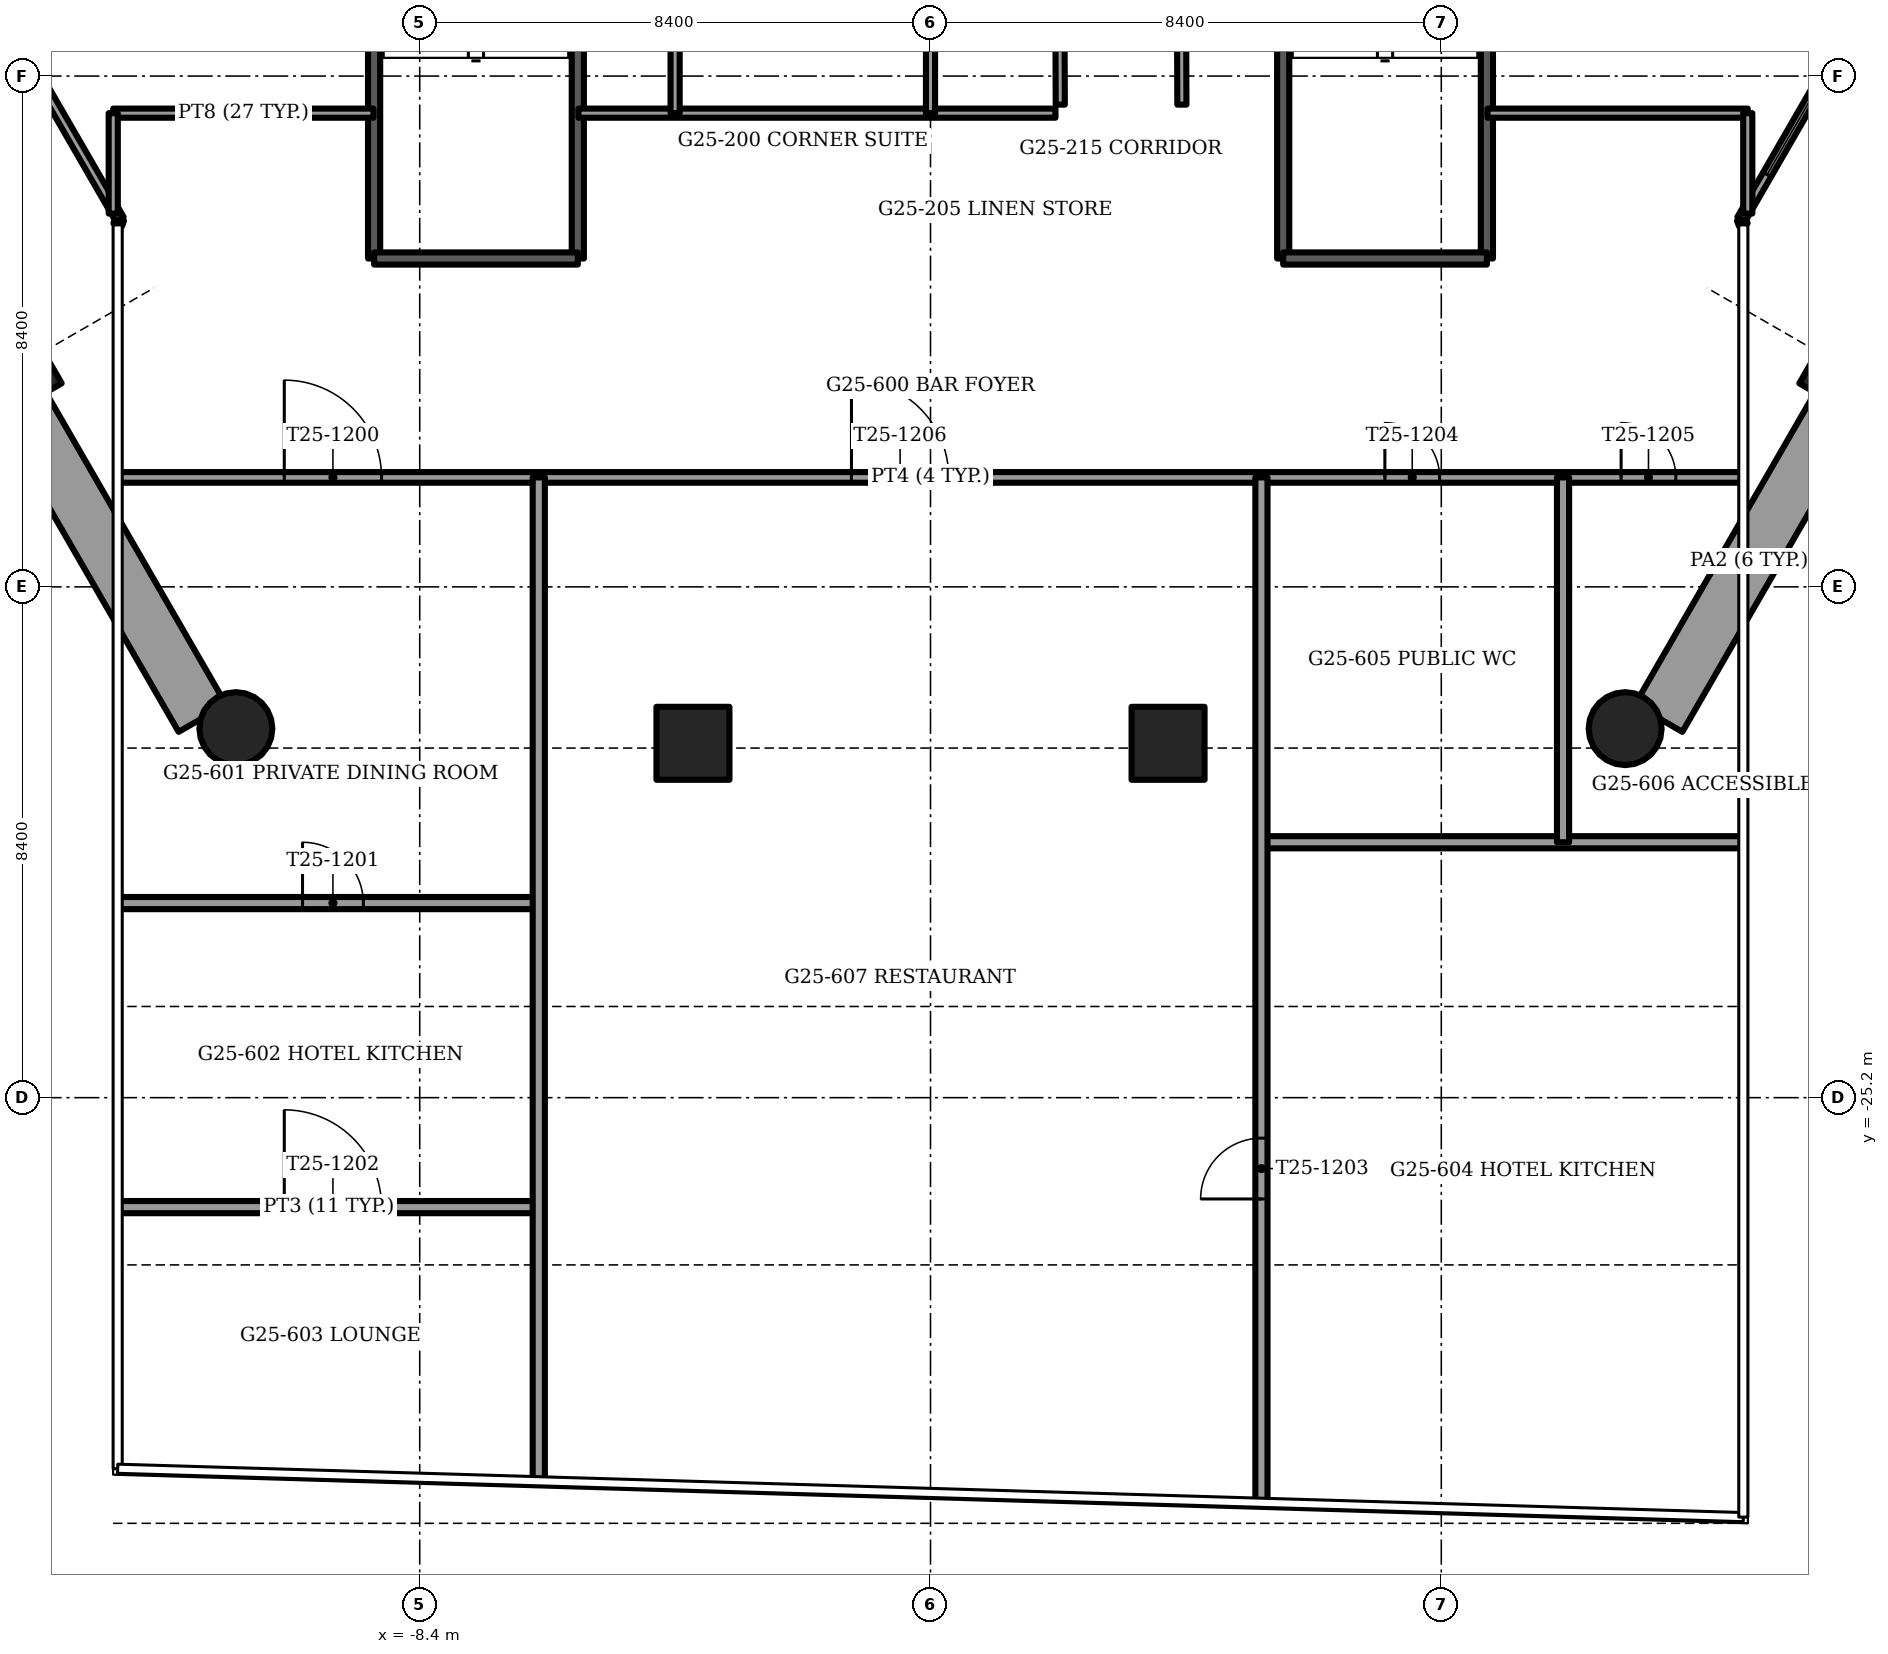
"""IFC4 building model, lengths in metres.
Left out: names, types, materials, properties, quantities, classifications, styles, units other than length and angle.
Written with IfcOpenShell. Run it as: python <this file> out.ifc"""

import sys

from ifc_helpers import new_model, si_unit, direction, frame, frame_2d, origin, origin_2d, place, context, subcontext, project, spatial, rectangle, circle, extrude, element, fill, save


model = new_model("IFC4")
c1 = context("Model", 3, precision=1e-05, world=origin(), true_north=direction((0.0, 1.0)))
c2 = subcontext(c1, "Body", "Model", "MODEL_VIEW")
j1 = project(units=[si_unit("LENGTHUNIT", "METRE"), si_unit("PLANEANGLEUNIT", "RADIAN")], contexts=[c1])
p1 = place(None, origin())
s1 = spatial("IfcSite", under=j1, at=p1, CompositionType="ELEMENT")
p2 = place(p1, origin())
s2 = spatial("IfcBuilding", under=s1, at=p2, CompositionType="ELEMENT")
p3 = place(p2, frame((0.0, 0.0, 100.5)))
s3 = spatial("IfcBuildingStorey", under=s2, at=p3, CompositionType="ELEMENT", Elevation=100.5)
for number, where, z_axis, x_axis in (
    (1, (-11.424, -19.132, -1.2), (0.0, 0.0, 1.0), (1.0, 0.0, 0.0)),
    (2, (11.424, -19.132, -1.2), (0.0, 0.0, 1.0), (1.0, 0.0, 0.0)),
):
    element("IfcColumn", number, at=place(p3, frame(where, z_axis=z_axis, x_axis=x_axis)), inside=s3, PredefinedType="COLUMN", context=c2, shape_type="SweptSolid", body=[
        extrude(circle(Radius=0.6, at=origin_2d()), origin(), (0.0, 0.0, 1.0), 3.75),
    ])
for number, where, z_axis, x_axis in (
    (3, (-15.107, -13.233, -1.2), (0.0, 0.0, 1.0), (-0.5, 0.866, 0.0)),
    (4, (-3.907, -19.373, -1.2), (0.0, 0.0, 1.0), (-1.0, 0.0, 0.0)),
    (5, (3.907, -19.373, -1.2), (0.0, 0.0, 1.0), (-1.0, 0.0, 0.0)),
    (6, (15.107, -13.233, -1.2), (0.0, 0.0, 1.0), (-0.5, -0.866, 0.0)),
):
    element("IfcColumn", number, at=place(p3, frame(where, z_axis=z_axis, x_axis=x_axis)), inside=s3, PredefinedType="COLUMN", context=c2, shape_type="SweptSolid", body=[
        extrude(rectangle(XDim=1.2, YDim=1.2, at=origin_2d()), origin(), (0.0, 0.0, 1.0), 3.75),
    ])
for number, where, z_axis, x_axis in (
    (7, (-14.952, -13.802, 0.0), (0.0, 0.0, 1.0), (0.5, -0.866, 0.0)),
    (8, (11.975, -18.959, 0.0), (0.0, 0.0, 1.0), (0.5, 0.866, 0.0)),
):
    element("IfcWall", number, at=place(p3, frame(where, z_axis=z_axis, x_axis=x_axis)), inside=s3, PredefinedType="PARAPET", context=c2, shape_type="SweptSolid", body=[
        extrude(rectangle(XDim=5.955, YDim=0.9, at=frame_2d((2.978, 0.0))), origin(), (0.0, 0.0, 1.0), 1.1),
    ])
p4 = place(p3, frame((-19.047, -0.86, 0.0), z_axis=(0.0, 0.0, 1.0), x_axis=(0.499999897272, -0.866025463095, 0.0)))
e9 = element("IfcWall", 9, at=p4, inside=s3, PredefinedType="SOLIDWALL", context=c2, shape_type="SweptSolid", body=[
    extrude(rectangle(XDim=11.426, YDim=0.15, at=frame_2d((5.713, 0.0))), origin(), (0.0, 0.0, 1.0), 3.45),
])
p5 = place(p4, frame((4.406, 0.0, 0.15)))
e10 = element("IfcOpeningElement", 10, at=p5, cuts=e9, PredefinedType="OPENING", context=c2, shape_type="SweptSolid", body=[
    extrude(rectangle(XDim=1.5, YDim=2.2, at=frame_2d((0.75, 1.1))), frame((0.0, 0.075, 0.0), z_axis=(0.0, -1.0, 0.0), x_axis=(1.0, 0.0, 0.0)), (0.0, 0.0, 1.0), 0.15),
])
p6 = place(p4, frame((6.979, 0.0, 0.15)))
e11 = element("IfcOpeningElement", 11, at=p6, cuts=e9, PredefinedType="OPENING", context=c2, shape_type="SweptSolid", body=[
    extrude(rectangle(XDim=1.7, YDim=2.2, at=frame_2d((0.85, 1.1))), frame((0.0, 0.075, 0.0), z_axis=(0.0, -1.0, 0.0), x_axis=(1.0, 0.0, 0.0)), (0.0, 0.0, 1.0), 0.15),
])
p7 = place(p3, frame((13.334, -10.755, 0.0), z_axis=(0.0, 0.0, 1.0), x_axis=(0.499999897272, 0.866025463095, 0.0)))
e12 = element("IfcWall", 12, at=p7, inside=s3, PredefinedType="SOLIDWALL", context=c2, shape_type="SweptSolid", body=[
    extrude(rectangle(XDim=11.426, YDim=0.15, at=frame_2d((5.713, 0.0))), origin(), (0.0, 0.0, 1.0), 3.45),
])
p8 = place(p7, frame((0.847, 0.0, 0.15)))
e13 = element("IfcOpeningElement", 13, at=p8, cuts=e12, PredefinedType="OPENING", context=c2, shape_type="SweptSolid", body=[
    extrude(rectangle(XDim=1.7, YDim=2.2, at=frame_2d((0.85, 1.1))), frame((0.0, 0.075, 0.0), z_axis=(0.0, -1.0, 0.0), x_axis=(1.0, 0.0, 0.0)), (0.0, 0.0, 1.0), 0.15),
])
p9 = place(p7, frame((6.322, 0.0, 0.15)))
e14 = element("IfcOpeningElement", 14, at=p9, cuts=e12, PredefinedType="OPENING", context=c2, shape_type="SweptSolid", body=[
    extrude(rectangle(XDim=1.5, YDim=2.2, at=frame_2d((0.75, 1.1))), frame((0.0, 0.075, 0.0), z_axis=(0.0, -1.0, 0.0), x_axis=(1.0, 0.0, 0.0)), (0.0, 0.0, 1.0), 0.15),
])
for number, where, z_axis, x_axis in (
    (15, (-13.334, -10.755, 0.0), (0.0, 0.0, 1.0), (-0.338, -0.941, 0.0)),
    (16, (13.334, -10.755, 0.0), (0.0, 0.0, 1.0), (0.338, -0.941, 0.0)),
):
    element("IfcWall", number, at=place(p3, frame(where, z_axis=z_axis, x_axis=x_axis)), inside=s3, PredefinedType="SOLIDWALL", context=c2, shape_type="SweptSolid", body=[
        extrude(rectangle(XDim=0.098, YDim=0.15, at=frame_2d((0.049, 0.0))), origin(), (0.0, 0.0, 1.0), 3.45),
    ])
for number, where, z_axis, x_axis in (
    (17, (5.8, -3.7, -0.3), (0.0, 0.0, 1.0), (0.0, -1.0, 0.0)),
    (18, (9.15, -3.7, -0.3), (0.0, 0.0, 1.0), (0.0, -1.0, 0.0)),
):
    element("IfcWall", number, at=place(p3, frame(where, z_axis=z_axis, x_axis=x_axis)), inside=s3, PredefinedType="SOLIDWALL", context=c2, shape_type="SweptSolid", body=[
        extrude(rectangle(XDim=7.7, YDim=0.2, at=frame_2d((3.85, 0.0))), origin(), (0.0, 0.0, 1.0), 3.75),
    ])
p10 = place(p3, frame((5.8, -11.4, -0.3), z_axis=(0.0, 0.0, 1.0), x_axis=(1.0, 0.0, 0.0)))
e19 = element("IfcWall", 19, at=p10, inside=s3, PredefinedType="SOLIDWALL", context=c2, shape_type="SweptSolid", body=[
    extrude(rectangle(XDim=3.35, YDim=0.2, at=frame_2d((1.675, 0.0))), origin(), (0.0, 0.0, 1.0), 3.75),
])
for number, where, z_axis, x_axis in (
    (20, (-9.15, -3.7, -0.3), (0.0, 0.0, 1.0), (0.0, -1.0, 0.0)),
    (21, (-5.8, -3.7, -0.3), (0.0, 0.0, 1.0), (0.0, -1.0, 0.0)),
):
    element("IfcWall", number, at=place(p3, frame(where, z_axis=z_axis, x_axis=x_axis)), inside=s3, PredefinedType="SOLIDWALL", context=c2, shape_type="SweptSolid", body=[
        extrude(rectangle(XDim=7.7, YDim=0.2, at=frame_2d((3.85, 0.0))), origin(), (0.0, 0.0, 1.0), 3.75),
    ])
p11 = place(p3, frame((-9.15, -11.4, -0.3), z_axis=(0.0, 0.0, 1.0), x_axis=(1.0, 0.0, 0.0)))
e22 = element("IfcWall", 22, at=p11, inside=s3, PredefinedType="SOLIDWALL", context=c2, shape_type="SweptSolid", body=[
    extrude(rectangle(XDim=3.35, YDim=0.2, at=frame_2d((1.675, 0.0))), origin(), (0.0, 0.0, 1.0), 3.75),
])
p12 = place(p3, frame((-13.44, -9.01, 0.0), z_axis=(0.0, 0.0, 1.0), x_axis=(1.0, 0.0, 0.0)))
e23 = element("IfcWall", 23, at=p12, inside=s3, PredefinedType="PARTITIONING", context=c2, shape_type="SweptSolid", body=[
    extrude(rectangle(XDim=4.28, YDim=0.15, at=frame_2d((2.14, 0.0))), origin(), (0.0, 0.0, 1.0), 3.45),
])
p13 = place(p3, frame((-5.79, -9.01, 0.0), z_axis=(0.0, 0.0, 1.0), x_axis=(1.0, 0.0, 0.0)))
e24 = element("IfcWall", 24, at=p13, inside=s3, PredefinedType="PARTITIONING", context=c2, shape_type="SweptSolid", body=[
    extrude(rectangle(XDim=7.845, YDim=0.15, at=frame_2d((3.922, 0.0))), origin(), (0.0, 0.0, 1.0), 3.45),
])
p14 = place(p3, frame((9.16, -9.01, 0.0), z_axis=(0.0, 0.0, 1.0), x_axis=(1.0, 0.0, 0.0)))
e25 = element("IfcWall", 25, at=p14, inside=s3, PredefinedType="PARTITIONING", context=c2, shape_type="SweptSolid", body=[
    extrude(rectangle(XDim=4.28, YDim=0.15, at=frame_2d((2.14, 0.0))), origin(), (0.0, 0.0, 1.0), 3.45),
])
p15 = place(p3, frame((13.44, -10.661, 0.0), z_axis=(0.0, 0.0, 1.0), x_axis=(0.0, 1.0, 0.0)))
e26 = element("IfcWall", 26, at=p15, inside=s3, PredefinedType="PARTITIONING", context=c2, shape_type="SweptSolid", body=[
    extrude(rectangle(XDim=1.651, YDim=0.15, at=frame_2d((0.825, 0.0))), origin(), (0.0, 0.0, 1.0), 3.45),
])
p16 = place(p3, frame((0.0, -9.01, 0.0), z_axis=(0.0, 0.0, 1.0), x_axis=(0.0, 1.0, 0.0)))
e27 = element("IfcWall", 27, at=p16, inside=s3, PredefinedType="PARTITIONING", context=c2, shape_type="SweptSolid", body=[
    extrude(rectangle(XDim=5.31, YDim=0.15, at=frame_2d((2.655, 0.0))), origin(), (0.0, 0.0, 1.0), 3.45),
])
p17 = place(p3, frame((-4.2, -9.01, 0.0), z_axis=(0.0, 0.0, 1.0), x_axis=(0.0, 1.0, 0.0)))
e28 = element("IfcWall", 28, at=p17, inside=s3, PredefinedType="PARTITIONING", context=c2, shape_type="SweptSolid", body=[
    extrude(rectangle(XDim=5.31, YDim=0.15, at=frame_2d((2.655, 0.0))), origin(), (0.0, 0.0, 1.0), 3.45),
])
p18 = place(p17, frame((3.86, 0.0, 0.0)))
e29 = element("IfcOpeningElement", 29, at=p18, cuts=e28, PredefinedType="OPENING", context=c2, shape_type="SweptSolid", body=[
    extrude(rectangle(XDim=0.9, YDim=2.1, at=frame_2d((0.45, 1.05))), frame((0.0, 0.075, 0.0), z_axis=(0.0, -1.0, 0.0), x_axis=(1.0, 0.0, 0.0)), (0.0, 0.0, 1.0), 0.15),
])
p19 = place(p3, frame((-13.44, -10.661, 0.0), z_axis=(0.0, 0.0, 1.0), x_axis=(0.0, 1.0, 0.0)))
e30 = element("IfcWall", 30, at=p19, inside=s3, PredefinedType="PARTITIONING", context=c2, shape_type="SweptSolid", body=[
    extrude(rectangle(XDim=1.651, YDim=0.15, at=frame_2d((0.825, 0.0))), origin(), (0.0, 0.0, 1.0), 3.45),
])
p20 = place(p3, frame((4.134, -8.87, 0.0), z_axis=(0.0, 0.0, 1.0), x_axis=(-0.003683216269, 0.999993216936, 0.0)))
e31 = element("IfcWall", 31, at=p20, inside=s3, PredefinedType="PARTITIONING", context=c2, shape_type="SweptSolid", body=[
    extrude(rectangle(XDim=5.17, YDim=0.15, at=frame_2d((2.585, 0.0))), origin(), (0.0, 0.0, 1.0), 3.45),
])
p21 = place(p3, frame((2.134, -8.87, 0.0), z_axis=(0.0, 0.0, 1.0), x_axis=(-0.003686872276, 0.999993203463, 0.0)))
e32 = element("IfcWall", 32, at=p21, inside=s3, PredefinedType="PARTITIONING", context=c2, shape_type="SweptSolid", body=[
    extrude(rectangle(XDim=5.165, YDim=0.15, at=frame_2d((2.583, 0.0))), origin(), (0.0, 0.0, 1.0), 3.45),
])
p22 = place(p3, frame((-13.348, -15.0, 0.0), z_axis=(0.0, 0.0, 1.0), x_axis=(1.0, 0.0, 0.0)))
e33 = element("IfcWall", 33, at=p22, inside=s3, PredefinedType="PARTITIONING", context=c2, shape_type="SweptSolid", body=[
    extrude(rectangle(XDim=26.696, YDim=0.175, at=frame_2d((13.348, 0.0))), origin(), (0.0, 0.0, 1.0), 3.45),
])
p23 = place(p22, frame((2.721, 0.0, 0.0)))
e34 = element("IfcOpeningElement", 34, at=p23, cuts=e33, PredefinedType="OPENING", context=c2, shape_type="SweptSolid", body=[
    extrude(rectangle(XDim=1.6, YDim=2.1, at=frame_2d((0.8, 1.05))), frame((0.0, 0.087, 0.0), z_axis=(0.0, -1.0, 0.0), x_axis=(1.0, 0.0, 0.0)), (0.0, 0.0, 1.0), 0.175),
])
p24 = place(p22, frame((20.82, 0.0, 0.0)))
e35 = element("IfcOpeningElement", 35, at=p24, cuts=e33, PredefinedType="OPENING", context=c2, shape_type="SweptSolid", body=[
    extrude(rectangle(XDim=0.9, YDim=2.1, at=frame_2d((0.45, 1.05))), frame((0.0, 0.087, 0.0), z_axis=(0.0, -1.0, 0.0), x_axis=(1.0, 0.0, 0.0)), (0.0, 0.0, 1.0), 0.175),
])
p25 = place(p22, frame((24.705, 0.0, 0.0)))
e36 = element("IfcOpeningElement", 36, at=p25, cuts=e33, PredefinedType="OPENING", context=c2, shape_type="SweptSolid", body=[
    extrude(rectangle(XDim=0.9, YDim=2.1, at=frame_2d((0.45, 1.05))), frame((0.0, 0.087, 0.0), z_axis=(0.0, -1.0, 0.0), x_axis=(1.0, 0.0, 0.0)), (0.0, 0.0, 1.0), 0.175),
])
p26 = place(p22, frame((12.048, 0.0, 0.0)))
e37 = element("IfcOpeningElement", 37, at=p26, cuts=e33, PredefinedType="OPENING", context=c2, shape_type="SweptSolid", body=[
    extrude(rectangle(XDim=1.6, YDim=2.1, at=frame_2d((0.8, 1.05))), frame((0.0, 0.087, 0.0), z_axis=(0.0, -1.0, 0.0), x_axis=(1.0, 0.0, 0.0)), (0.0, 0.0, 1.0), 0.175),
])
p27 = place(p3, frame((-13.348, -27.0, 0.0), z_axis=(0.0, 0.0, 1.0), x_axis=(1.0, 0.0, 0.0)))
e38 = element("IfcWall", 38, at=p27, inside=s3, PredefinedType="PARTITIONING", context=c2, shape_type="SweptSolid", body=[
    extrude(rectangle(XDim=6.906, YDim=0.2, at=frame_2d((3.453, 0.0))), origin(), (0.0, 0.0, 1.0), 3.45),
])
p28 = place(p27, frame((2.721, 0.0, 0.0)))
e39 = element("IfcOpeningElement", 39, at=p28, cuts=e38, PredefinedType="OPENING", context=c2, shape_type="SweptSolid", body=[
    extrude(rectangle(XDim=1.6, YDim=2.1, at=frame_2d((0.8, 1.05))), frame((0.0, 0.1, 0.0), z_axis=(0.0, -1.0, 0.0), x_axis=(1.0, 0.0, 0.0)), (0.0, 0.0, 1.0), 0.2),
])
p29 = place(p3, frame((-13.348, -22.0, 0.0), z_axis=(0.0, 0.0, 1.0), x_axis=(1.0, 0.0, 0.0)))
e40 = element("IfcWall", 40, at=p29, inside=s3, PredefinedType="PARTITIONING", context=c2, shape_type="SweptSolid", body=[
    extrude(rectangle(XDim=6.906, YDim=0.2, at=frame_2d((3.453, 0.0))), origin(), (0.0, 0.0, 1.0), 3.45),
])
p30 = place(p29, frame((3.021, 0.0, 0.0)))
e41 = element("IfcOpeningElement", 41, at=p30, cuts=e40, PredefinedType="OPENING", context=c2, shape_type="SweptSolid", body=[
    extrude(rectangle(XDim=1.0, YDim=2.1, at=frame_2d((0.5, 1.05))), frame((0.0, 0.1, 0.0), z_axis=(0.0, -1.0, 0.0), x_axis=(1.0, 0.0, 0.0)), (0.0, 0.0, 1.0), 0.2),
])
p31 = place(p3, frame((5.442, -21.0, 0.0), z_axis=(0.0, 0.0, 1.0), x_axis=(1.0, 0.0, 0.0)))
e42 = element("IfcWall", 42, at=p31, inside=s3, PredefinedType="PARTITIONING", context=c2, shape_type="SweptSolid", body=[
    extrude(rectangle(XDim=7.906, YDim=0.2, at=frame_2d((3.953, 0.0))), origin(), (0.0, 0.0, 1.0), 3.45),
])
p32 = place(p3, frame((-6.442, -31.489, 0.0), z_axis=(0.0, 0.0, 1.0), x_axis=(0.0, 1.0, 0.0)))
e43 = element("IfcWall", 43, at=p32, inside=s3, PredefinedType="PARTITIONING", context=c2, shape_type="SweptSolid", body=[
    extrude(rectangle(XDim=16.489, YDim=0.2, at=frame_2d((8.245, 0.0))), origin(), (0.0, 0.0, 1.0), 2.828),
])
p33 = place(p3, frame((5.442, -31.843, 0.0), z_axis=(0.0, 0.0, 1.0), x_axis=(0.0, 1.0, 0.0)))
e44 = element("IfcWall", 44, at=p33, inside=s3, PredefinedType="PARTITIONING", context=c2, shape_type="SweptSolid", body=[
    extrude(rectangle(XDim=16.843, YDim=0.2, at=frame_2d((8.421, 0.0))), origin(), (0.0, 0.0, 1.0), 2.828),
])
p34 = place(p33, frame((4.977, 0.0, 0.0)))
e45 = element("IfcOpeningElement", 45, at=p34, cuts=e44, PredefinedType="OPENING", context=c2, shape_type="SweptSolid", body=[
    extrude(rectangle(XDim=1.0, YDim=2.1, at=frame_2d((0.5, 1.05))), frame((0.0, 0.1, 0.0), z_axis=(0.0, -1.0, 0.0), x_axis=(1.0, 0.0, 0.0)), (0.0, 0.0, 1.0), 0.2),
])
p35 = place(p3, frame((10.402, -21.0, 0.0), z_axis=(0.0, 0.0, 1.0), x_axis=(0.0, 1.0, 0.0)))
e46 = element("IfcWall", 46, at=p35, inside=s3, PredefinedType="PARTITIONING", context=c2, shape_type="SweptSolid", body=[
    extrude(rectangle(XDim=6.0, YDim=0.2, at=frame_2d((3.0, 0.0))), origin(), (0.0, 0.0, 1.0), 2.828),
])
p36 = place(p8, origin())
e47 = element("IfcWindow", 47, at=p36, inside=s3, PartitioningType="SINGLE_PANEL", PredefinedType="WINDOW", context=c2, shape_type="SweptSolid", body=[
    extrude(rectangle(XDim=1.7, YDim=2.2, at=frame_2d((0.85, 1.1))), frame((0.0, 0.03, 0.0), z_axis=(0.0, -1.0, 0.0), x_axis=(1.0, 0.0, 0.0)), (0.0, 0.0, 1.0), 0.06),
])
fill(e13, e47)
p37 = place(p23, origin())
e48 = element("IfcDoor", 48, at=p37, inside=s3, OperationType="DOUBLE_DOOR_SINGLE_SWING", PredefinedType="DOOR", context=c2, shape_type="SweptSolid", body=[
    extrude(rectangle(XDim=1.6, YDim=2.1, at=frame_2d((0.8, 1.05))), frame((0.0, 0.025, 0.0), z_axis=(0.0, -1.0, 0.0), x_axis=(1.0, 0.0, 0.0)), (0.0, 0.0, 1.0), 0.05),
])
fill(e34, e48)
p38 = place(p30, origin())
e49 = element("IfcDoor", 49, at=p38, inside=s3, OperationType="SINGLE_SWING_LEFT", PredefinedType="DOOR", context=c2, shape_type="SweptSolid", body=[
    extrude(rectangle(XDim=1.0, YDim=2.1, at=frame_2d((0.5, 1.05))), frame((0.0, 0.025, 0.0), z_axis=(0.0, -1.0, 0.0), x_axis=(1.0, 0.0, 0.0)), (0.0, 0.0, 1.0), 0.05),
])
fill(e41, e49)
p39 = place(p28, origin())
e50 = element("IfcDoor", 50, at=p39, inside=s3, OperationType="DOUBLE_DOOR_SINGLE_SWING", PredefinedType="DOOR", context=c2, shape_type="SweptSolid", body=[
    extrude(rectangle(XDim=1.6, YDim=2.1, at=frame_2d((0.8, 1.05))), frame((0.0, 0.025, 0.0), z_axis=(0.0, -1.0, 0.0), x_axis=(1.0, 0.0, 0.0)), (0.0, 0.0, 1.0), 0.05),
])
fill(e39, e50)
p40 = place(p34, origin())
e51 = element("IfcDoor", 51, at=p40, inside=s3, OperationType="SINGLE_SWING_LEFT", PredefinedType="DOOR", context=c2, shape_type="SweptSolid", body=[
    extrude(rectangle(XDim=1.0, YDim=2.1, at=frame_2d((0.5, 1.05))), frame((0.0, 0.025, 0.0), z_axis=(0.0, -1.0, 0.0), x_axis=(1.0, 0.0, 0.0)), (0.0, 0.0, 1.0), 0.05),
])
fill(e45, e51)
p41 = place(p24, origin())
e52 = element("IfcDoor", 52, at=p41, inside=s3, OperationType="SINGLE_SWING_RIGHT", PredefinedType="DOOR", context=c2, shape_type="SweptSolid", body=[
    extrude(rectangle(XDim=0.9, YDim=2.1, at=frame_2d((0.45, 1.05))), frame((0.0, 0.025, 0.0), z_axis=(0.0, -1.0, 0.0), x_axis=(1.0, 0.0, 0.0)), (0.0, 0.0, 1.0), 0.05),
])
fill(e35, e52)
p42 = place(p25, origin())
e53 = element("IfcDoor", 53, at=p42, inside=s3, OperationType="SINGLE_SWING_LEFT", PredefinedType="DOOR", context=c2, shape_type="SweptSolid", body=[
    extrude(rectangle(XDim=0.9, YDim=2.1, at=frame_2d((0.45, 1.05))), frame((0.0, 0.025, 0.0), z_axis=(0.0, -1.0, 0.0), x_axis=(1.0, 0.0, 0.0)), (0.0, 0.0, 1.0), 0.05),
])
fill(e36, e53)
p43 = place(p26, origin())
e54 = element("IfcDoor", 54, at=p43, inside=s3, OperationType="DOUBLE_DOOR_SINGLE_SWING", PredefinedType="DOOR", context=c2, shape_type="SweptSolid", body=[
    extrude(rectangle(XDim=1.6, YDim=2.1, at=frame_2d((0.8, 1.05))), frame((0.0, 0.025, 0.0), z_axis=(0.0, -1.0, 0.0), x_axis=(1.0, 0.0, 0.0)), (0.0, 0.0, 1.0), 0.05),
])
fill(e37, e54)
save(model, sys.argv[1])
